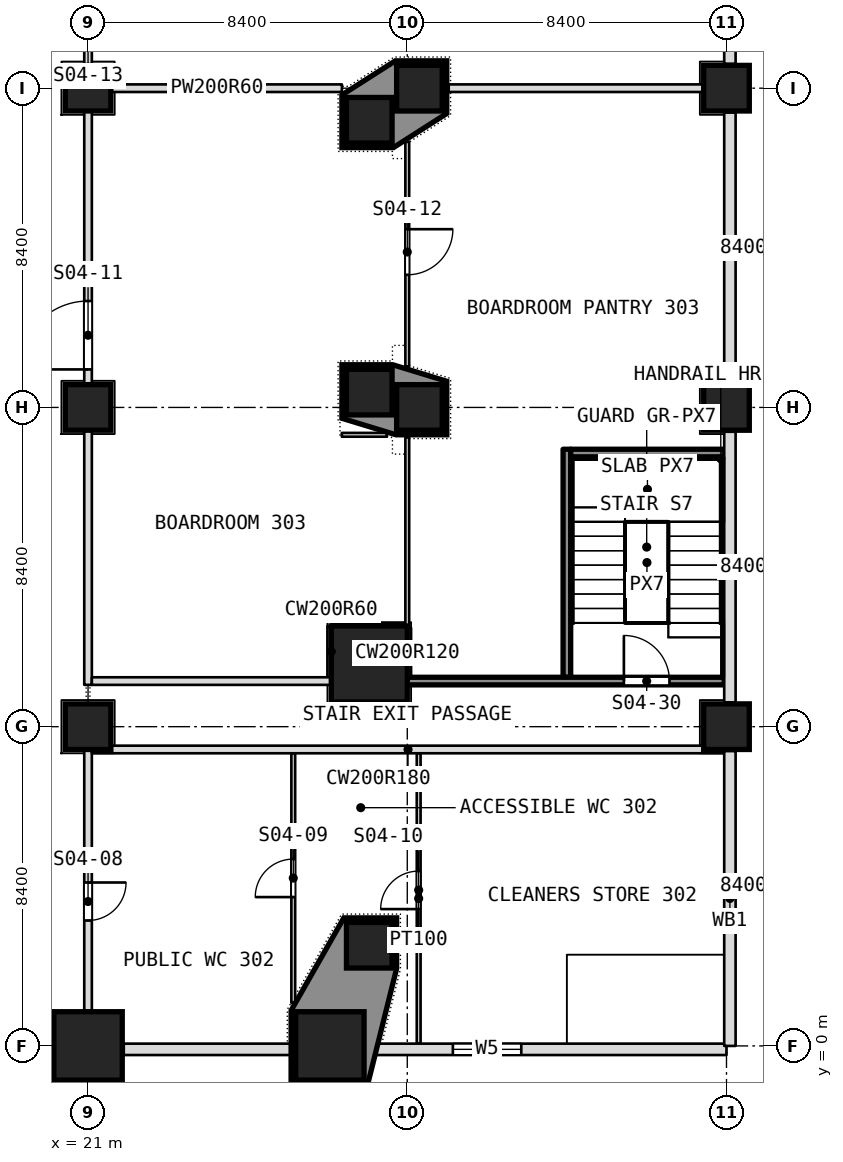
"""IFC4 building model, lengths in metres.
Left out: names, types, materials, properties, quantities, classifications, styles, units other than length and angle.
Written with IfcOpenShell. Run it as: python <this file> out.ifc"""

import sys

from ifc_helpers import new_model, si_unit, direction, frame, frame_2d, origin, origin_2d, place, context, subcontext, project, spatial, polyline, rectangle, outline, extrude, element, fill, save


model = new_model("IFC4")
c1 = context("Model", 3, precision=1e-05, world=origin(), true_north=direction((0.0, 1.0)))
c2 = subcontext(c1, "Body", "Model", "MODEL_VIEW")
j1 = project(units=[si_unit("LENGTHUNIT", "METRE"), si_unit("PLANEANGLEUNIT", "RADIAN")], contexts=[c1])
p1 = place(None, origin())
s1 = spatial("IfcSite", under=j1, at=p1, CompositionType="ELEMENT")
p2 = place(p1, origin())
s2 = spatial("IfcBuilding", under=s1, at=p2, CompositionType="ELEMENT")
p3 = place(p2, frame((0.0, 0.0, 21.0)))
s3 = spatial("IfcBuildingStorey", under=s2, at=p3, CompositionType="ELEMENT", Elevation=21.0)
p4 = place(p3, frame((21.0, 0.0, 0.0), z_axis=(0.0, 0.0, 1.0), x_axis=(1.0, 0.0, 0.0)))
e1 = element("IfcColumn", 1, at=p4, inside=s3, PredefinedType="COLUMN", context=c2, shape_type="SweptSolid", body=[
    extrude(rectangle(XDim=1.8, YDim=1.8, at=origin_2d()), origin(), (0.0, 0.0, 1.0), 5.0),
])
for number, where, z_axis, x_axis in (
    (2, (21.0, 8.4, 0.0), (0.0, 0.0, 1.0), (1.0, 0.0, 0.0)),
    (3, (37.8, 8.4, 0.0), (0.0, 0.0, 1.0), (1.0, 0.0, 0.0)),
    (4, (21.0, 16.8, 0.0), (0.0, 0.0, 1.0), (1.0, 0.0, 0.0)),
    (5, (29.72, 16.8, 0.0), (0.0, 0.0, 1.0), (1.0, 0.0, 0.0)),
    (6, (37.8, 16.8, 0.0), (0.0, 0.0, 1.0), (1.0, 0.0, 0.0)),
    (7, (21.0, 25.2, 0.0), (0.0, 0.0, 1.0), (1.0, 0.0, 0.0)),
    (8, (29.72, 25.2, 0.0), (0.0, 0.0, 1.0), (1.0, 0.0, 0.0)),
    (9, (37.8, 25.2, 0.0), (0.0, 0.0, 1.0), (1.0, 0.0, 0.0)),
):
    element("IfcColumn", number, at=place(p3, frame(where, z_axis=z_axis, x_axis=x_axis)), inside=s3, PredefinedType="COLUMN", context=c2, shape_type="SweptSolid", body=[
        extrude(rectangle(XDim=1.2, YDim=1.2, at=origin_2d()), origin(), (0.0, 0.0, 1.0), 5.0),
    ])
p5 = place(p3, frame((27.363, 0.0, 0.0), z_axis=(0.0, 0.0, 1.0), x_axis=(1.0, 0.0, 0.0)))
e10 = element("IfcColumn", 10, at=p5, inside=s3, PredefinedType="COLUMN", context=c2, shape_type="SweptSolid", body=[
    extrude(rectangle(XDim=1.8, YDim=1.8, at=origin_2d()), origin(), (0.0, 0.0, 1.0), 5.0),
])
p6 = place(p3, frame((28.4, 10.05, 0.0), z_axis=(0.0, 0.0, 1.0), x_axis=(1.0, 0.0, 0.0)))
e11 = element("IfcColumn", 11, at=p6, inside=s3, PredefinedType="COLUMN", context=c2, shape_type="SweptSolid", body=[
    extrude(rectangle(XDim=2.0, YDim=2.0, at=origin_2d()), origin(), (0.0, 0.0, 1.0), 5.0),
])
p7 = place(p3, frame((37.8, 2.4, 0.0), z_axis=(1.0, 0.0, 0.0), x_axis=(0.0, 0.0, 1.0)))
e12 = element("IfcWall", 12, at=p7, inside=s3, PredefinedType="SOLIDWALL", context=c2, shape_type="SweptSolid", body=[
    extrude(outline(polyline([(0.0, 0.0), (5.0, 0.0), (5.0, 5.279), (4.641, 4.8), (3.435, 3.6), (1.8, 2.4), (0.0, 1.495), (0.0, 0.0)])), origin(), (0.0, 0.0, -1.0), 4.2),
])
for number, where, z_axis, x_axis in (
    (13, (28.4, 24.356, 0.0), (0.0, 0.0, 1.0), (1.0, 0.0, 0.0)),
    (14, (28.4, 17.203, 0.0), (0.0, 0.0, 1.0), (1.0, 0.0, 0.0)),
    (15, (28.4, 2.649, 0.0), (0.0, 0.0, 1.0), (1.0, 0.0, 0.0)),
):
    element("IfcColumn", number, at=place(p3, frame(where, z_axis=z_axis, x_axis=x_axis)), inside=s3, PredefinedType="COLUMN", context=c2, shape_type="SweptSolid", body=[
        extrude(rectangle(XDim=1.2, YDim=1.2, at=origin_2d()), origin(), (0.0, 0.0, 1.0), 5.0),
    ])
p8 = place(p3, frame((33.6, 9.7, 0.0), z_axis=(0.0, 0.0, 1.0), x_axis=(0.0, 1.0, 0.0)))
e16 = element("IfcWall", 16, at=p8, inside=s3, PredefinedType="PARTITIONING", context=c2, shape_type="SweptSolid", body=[
    extrude(rectangle(XDim=6.0, YDim=0.2, at=frame_2d((3.0, 0.0))), origin(), (0.0, 0.0, 1.0), 4.68),
])
p9 = place(p3, frame((29.7, 0.06, 0.0), z_axis=(0.0, 0.0, 1.0), x_axis=(0.0, 1.0, 0.0)))
e17 = element("IfcWall", 17, at=p9, inside=s3, PredefinedType="PARTITIONING", context=c2, shape_type="SweptSolid", body=[
    extrude(rectangle(XDim=7.64, YDim=0.1, at=frame_2d((3.82, 0.0))), origin(), (0.0, 0.0, 1.0), 4.68),
])
p10 = place(p9, frame((3.54, 0.0, 0.0)))
e18 = element("IfcOpeningElement", 18, at=p10, cuts=e17, PredefinedType="OPENING", context=c2, shape_type="SweptSolid", body=[
    extrude(rectangle(XDim=1.0, YDim=2.1, at=frame_2d((0.5, 1.05))), frame((0.0, 0.05, 0.0), z_axis=(0.0, -1.0, 0.0), x_axis=(1.0, 0.0, 0.0)), (0.0, 0.0, 1.0), 0.1),
])
p11 = place(p3, frame((29.4, 9.7, 0.0), z_axis=(0.0, 0.0, 1.0), x_axis=(0.0, 1.0, 0.0)))
e19 = element("IfcWall", 19, at=p11, inside=s3, PredefinedType="PARTITIONING", context=c2, shape_type="SweptSolid", body=[
    extrude(rectangle(XDim=1.3, YDim=0.2, at=frame_2d((0.65, 0.0))), origin(), (0.0, 0.0, 1.0), 4.68),
])
p12 = place(p3, frame((29.4, 11.0, 0.0), z_axis=(0.0, 0.0, 1.0), x_axis=(0.0, 1.0, 0.0)))
e20 = element("IfcWall", 20, at=p12, inside=s3, PredefinedType="PARTITIONING", context=c2, shape_type="SweptSolid", body=[
    extrude(rectangle(XDim=5.012, YDim=0.1, at=frame_2d((2.506, 0.0))), origin(), (0.0, 0.0, 1.0), 4.68),
])
p13 = place(p3, frame((29.4, 17.878, 0.0), z_axis=(0.0, 0.0, 1.0), x_axis=(0.0, 1.0, 0.0)))
e21 = element("IfcWall", 21, at=p13, inside=s3, PredefinedType="PARTITIONING", context=c2, shape_type="SweptSolid", body=[
    extrude(rectangle(XDim=5.911, YDim=0.1, at=frame_2d((2.956, 0.0))), origin(), (0.0, 0.0, 1.0), 4.68),
])
p14 = place(p13, frame((2.412, 0.0, 0.0)))
e22 = element("IfcOpeningElement", 22, at=p14, cuts=e21, PredefinedType="OPENING", context=c2, shape_type="SweptSolid", body=[
    extrude(rectangle(XDim=1.2, YDim=2.1, at=frame_2d((0.6, 1.05))), frame((0.0, 0.05, 0.0), z_axis=(0.0, -1.0, 0.0), x_axis=(1.0, 0.0, 0.0)), (0.0, 0.0, 1.0), 0.1),
])
p15 = place(p3, frame((27.4, 9.7, 0.0), z_axis=(0.0, 0.0, 1.0), x_axis=(0.0, 1.0, 0.0)))
e23 = element("IfcWall", 23, at=p15, inside=s3, PredefinedType="PARTITIONING", context=c2, shape_type="SweptSolid", body=[
    extrude(rectangle(XDim=1.352, YDim=0.2, at=frame_2d((0.676, 0.0))), origin(), (0.0, 0.0, 1.0), 4.68),
])
p16 = place(p3, frame((26.4, 1.133, 0.0), z_axis=(0.0, 0.0, 1.0), x_axis=(0.0, 1.0, 0.0)))
e24 = element("IfcWall", 24, at=p16, inside=s3, PredefinedType="PARTITIONING", context=c2, shape_type="SweptSolid", body=[
    extrude(rectangle(XDim=6.567, YDim=0.1, at=frame_2d((3.283, 0.0))), origin(), (0.0, 0.0, 1.0), 4.68),
])
p17 = place(p16, frame((2.783, 0.0, 0.0)))
e25 = element("IfcOpeningElement", 25, at=p17, cuts=e24, PredefinedType="OPENING", context=c2, shape_type="SweptSolid", body=[
    extrude(rectangle(XDim=1.0, YDim=2.1, at=frame_2d((0.5, 1.05))), frame((0.0, 0.05, 0.0), z_axis=(0.0, -1.0, 0.0), x_axis=(1.0, 0.0, 0.0)), (0.0, 0.0, 1.0), 0.1),
])
p18 = place(p3, frame((21.0, -0.3, 0.0), z_axis=(0.0, 0.0, 1.0), x_axis=(0.0, 1.0, 0.0)))
e26 = element("IfcWall", 26, at=p18, inside=s3, PredefinedType="PARTITIONING", context=c2, shape_type="SweptSolid", body=[
    extrude(rectangle(XDim=8.2, YDim=0.2, at=frame_2d((4.1, 0.0))), origin(), (0.0, 0.0, 1.0), 4.68),
])
p19 = place(p18, frame((3.6, 0.0, 0.0)))
e27 = element("IfcOpeningElement", 27, at=p19, cuts=e26, PredefinedType="OPENING", context=c2, shape_type="SweptSolid", body=[
    extrude(rectangle(XDim=1.0, YDim=2.1, at=frame_2d((0.5, 1.05))), frame((0.0, 0.1, 0.0), z_axis=(0.0, -1.0, 0.0), x_axis=(1.0, 0.0, 0.0)), (0.0, 0.0, 1.0), 0.2),
])
p20 = place(p3, frame((21.0, 9.5, 0.0), z_axis=(0.0, 0.0, 1.0), x_axis=(0.0, 1.0, 0.0)))
e28 = element("IfcWall", 28, at=p20, inside=s3, PredefinedType="PARTITIONING", context=c2, shape_type="SweptSolid", body=[
    extrude(rectangle(XDim=22.871, YDim=0.2, at=frame_2d((11.436, 0.0))), origin(), (0.0, 0.0, 1.0), 4.68),
])
p21 = place(p20, frame((8.3, 0.0, 0.0)))
e29 = element("IfcOpeningElement", 29, at=p21, cuts=e28, PredefinedType="OPENING", context=c2, shape_type="SweptSolid", body=[
    extrude(rectangle(XDim=1.8, YDim=2.1, at=frame_2d((0.9, 1.05))), frame((0.0, 0.1, 0.0), z_axis=(0.0, -1.0, 0.0), x_axis=(1.0, 0.0, 0.0)), (0.0, 0.0, 1.0), 0.2),
])
p22 = place(p20, frame((16.717, 0.0, 0.0)))
e30 = element("IfcOpeningElement", 30, at=p22, cuts=e28, PredefinedType="OPENING", context=c2, shape_type="SweptSolid", body=[
    extrude(rectangle(XDim=1.8, YDim=2.1, at=frame_2d((0.9, 1.05))), frame((0.0, 0.1, 0.0), z_axis=(0.0, -1.0, 0.0), x_axis=(1.0, 0.0, 0.0)), (0.0, 0.0, 1.0), 0.2),
])
p23 = place(p3, frame((21.1, 7.8, 0.0), z_axis=(0.0, 0.0, 1.0), x_axis=(1.0, 0.0, 0.0)))
e31 = element("IfcWall", 31, at=p23, inside=s3, PredefinedType="PARTITIONING", context=c2, shape_type="SweptSolid", body=[
    extrude(rectangle(XDim=16.64, YDim=0.2, at=frame_2d((8.32, 0.0))), origin(), (0.0, 0.0, 1.0), 4.68),
])
p24 = place(p3, frame((21.1, 9.6, 0.0), z_axis=(0.0, 0.0, 1.0), x_axis=(1.0, 0.0, 0.0)))
e32 = element("IfcWall", 32, at=p24, inside=s3, PredefinedType="PARTITIONING", context=c2, shape_type="SweptSolid", body=[
    extrude(rectangle(XDim=6.4, YDim=0.2, at=frame_2d((3.2, 0.0))), origin(), (0.0, 0.0, 1.0), 4.68),
])
p25 = place(p3, frame((29.3, 9.6, 0.0), z_axis=(0.0, 0.0, 1.0), x_axis=(1.0, 0.0, 0.0)))
e33 = element("IfcWall", 33, at=p25, inside=s3, PredefinedType="PARTITIONING", context=c2, shape_type="SweptSolid", body=[
    extrude(rectangle(XDim=8.44, YDim=0.2, at=frame_2d((4.22, 0.0))), origin(), (0.0, 0.0, 1.0), 4.68),
])
p26 = place(p25, frame((5.8, 0.0, 0.0)))
e34 = element("IfcOpeningElement", 34, at=p26, cuts=e33, PredefinedType="OPENING", context=c2, shape_type="SweptSolid", body=[
    extrude(rectangle(XDim=1.2, YDim=2.1, at=frame_2d((0.6, 1.05))), frame((0.0, 0.1, 0.0), z_axis=(0.0, -1.0, 0.0), x_axis=(1.0, 0.0, 0.0)), (0.0, 0.0, 1.0), 0.2),
])
p27 = place(p3, frame((27.398, 11.05, 0.0), z_axis=(0.0, 0.0, 1.0), x_axis=(1.0, 0.0, 0.0)))
e35 = element("IfcWall", 35, at=p27, inside=s3, PredefinedType="PARTITIONING", context=c2, shape_type="SweptSolid", body=[
    extrude(rectangle(XDim=1.952, YDim=0.1, at=frame_2d((0.976, 0.0))), origin(), (0.0, 0.0, 1.0), 4.68),
])
p28 = place(p3, frame((33.7, 15.6, 0.0), z_axis=(0.0, 0.0, 1.0), x_axis=(1.0, 0.0, 0.0)))
e36 = element("IfcWall", 36, at=p28, inside=s3, PredefinedType="PARTITIONING", context=c2, shape_type="SweptSolid", body=[
    extrude(rectangle(XDim=4.04, YDim=0.2, at=frame_2d((2.02, 0.0))), origin(), (0.0, 0.0, 1.0), 4.68),
])
p29 = place(p3, frame((27.678, 16.08, 0.0), z_axis=(0.0, 0.0, 1.0), x_axis=(1.0, 0.0, 0.0)))
e37 = element("IfcWall", 37, at=p29, inside=s3, PredefinedType="PARTITIONING", context=c2, shape_type="SweptSolid", body=[
    extrude(rectangle(XDim=1.186, YDim=0.1, at=frame_2d((0.593, 0.0))), origin(), (0.0, 0.0, 1.0), 4.68),
])
p30 = place(p3, frame((21.1, 25.2, 0.0), z_axis=(0.0, 0.0, 1.0), x_axis=(1.0, 0.0, 0.0)))
e38 = element("IfcWall", 38, at=p30, inside=s3, PredefinedType="PARTITIONING", context=c2, shape_type="SweptSolid", body=[
    extrude(rectangle(XDim=6.58, YDim=0.2, at=frame_2d((3.29, 0.0))), origin(), (0.0, 0.0, 1.0), 4.68),
])
p31 = place(p3, frame((30.49, 25.2, 0.0), z_axis=(0.0, 0.0, 1.0), x_axis=(1.0, 0.0, 0.0)))
e39 = element("IfcWall", 39, at=p31, inside=s3, PredefinedType="PARTITIONING", context=c2, shape_type="SweptSolid", body=[
    extrude(rectangle(XDim=7.61, YDim=0.2, at=frame_2d((3.805, 0.0))), origin(), (0.0, 0.0, 1.0), 4.68),
])
p32 = place(p3, frame((16.8, -0.09, 0.0), z_axis=(0.0, 0.0, 1.0), x_axis=(1.0, 0.0, 0.0)))
e40 = element("IfcWall", 40, at=p32, inside=s3, PredefinedType="NOTDEFINED", context=c2, shape_type="SweptSolid", body=[
    extrude(rectangle(XDim=3.26, YDim=0.3, at=frame_2d((1.63, 0.0))), origin(), (0.0, 0.0, 1.0), 5.0),
])
p33 = place(p3, frame((21.94, -0.09, 0.0), z_axis=(0.0, 0.0, 1.0), x_axis=(1.0, 0.0, 0.0)))
e41 = element("IfcWall", 41, at=p33, inside=s3, PredefinedType="NOTDEFINED", context=c2, shape_type="SweptSolid", body=[
    extrude(rectangle(XDim=4.483, YDim=0.3, at=frame_2d((2.242, 0.0))), origin(), (0.0, 0.0, 1.0), 3.78),
])
p34 = place(p3, frame((28.303, -0.09, 0.0), z_axis=(0.0, 0.0, 1.0), x_axis=(1.0, 0.0, 0.0)))
e42 = element("IfcWall", 42, at=p34, inside=s3, PredefinedType="NOTDEFINED", context=c2, shape_type="SweptSolid", body=[
    extrude(rectangle(XDim=9.497, YDim=0.3, at=frame_2d((4.749, 0.0))), origin(), (0.0, 0.0, 1.0), 3.78),
])
p35 = place(p34, frame((2.297, 0.0, 1.2)))
e43 = element("IfcOpeningElement", 43, at=p35, cuts=e42, PredefinedType="OPENING", context=c2, shape_type="SweptSolid", body=[
    extrude(rectangle(XDim=1.8, YDim=2.4, at=frame_2d((0.9, 1.2))), frame((0.0, 0.15, 0.0), z_axis=(0.0, -1.0, 0.0), x_axis=(1.0, 0.0, 0.0)), (0.0, 0.0, 1.0), 0.3),
])
p36 = place(p3, frame((37.89, 0.0, 0.0), z_axis=(0.0, 0.0, 1.0), x_axis=(0.0, 1.0, 0.0)))
e44 = element("IfcWall", 44, at=p36, inside=s3, PredefinedType="NOTDEFINED", context=c2, shape_type="SweptSolid", body=[
    extrude(rectangle(XDim=7.76, YDim=0.3, at=frame_2d((3.88, 0.0))), origin(), (0.0, 0.0, 1.0), 3.78),
])
p37 = place(p3, frame((37.89, 9.04, 0.0), z_axis=(0.0, 0.0, 1.0), x_axis=(0.0, 1.0, 0.0)))
e45 = element("IfcWall", 45, at=p37, inside=s3, PredefinedType="NOTDEFINED", context=c2, shape_type="SweptSolid", body=[
    extrude(rectangle(XDim=7.12, YDim=0.3, at=frame_2d((3.56, 0.0))), origin(), (0.0, 0.0, 1.0), 5.0),
])
p38 = place(p3, frame((37.89, 17.44, 0.0), z_axis=(0.0, 0.0, 1.0), x_axis=(0.0, 1.0, 0.0)))
e46 = element("IfcWall", 46, at=p38, inside=s3, PredefinedType="NOTDEFINED", context=c2, shape_type="SweptSolid", body=[
    extrude(rectangle(XDim=7.12, YDim=0.3, at=frame_2d((3.56, 0.0))), origin(), (0.0, 0.0, 1.0), 3.78),
])
p39 = place(p3, frame((37.89, 25.84, 0.0), z_axis=(0.0, 0.0, 1.0), x_axis=(0.0, 1.0, 0.0)))
e47 = element("IfcWall", 47, at=p39, inside=s3, PredefinedType="NOTDEFINED", context=c2, shape_type="SweptSolid", body=[
    extrude(rectangle(XDim=7.12, YDim=0.3, at=frame_2d((3.56, 0.0))), origin(), (0.0, 0.0, 1.0), 3.78),
])
p40 = place(p3, origin())
e48 = element("IfcWall", 48, at=p40, inside=s3, PredefinedType="SOLIDWALL", context=c2, shape_type="SweptSolid", body=[
    extrude(outline(polyline([(27.68, 25.022), (29.085, 25.92), (30.44, 25.92), (30.44, 24.534), (29.035, 23.636), (27.68, 23.636), (27.68, 25.022)]), holes=[polyline([(29.12, 24.6), (30.32, 24.6), (30.32, 25.8), (29.12, 25.8), (29.12, 24.6)]), polyline([(27.8, 23.756), (29.0, 23.756), (29.0, 24.956), (27.8, 24.956), (27.8, 23.756)])]), origin(), (0.0, 0.0, 1.0), 5.0),
])
p41 = place(p3, origin())
e49 = element("IfcWall", 49, at=p41, inside=s3, PredefinedType="SOLIDWALL", context=c2, shape_type="SweptSolid", body=[
    extrude(outline(polyline([(27.68, 16.514), (27.68, 17.923), (29.018, 17.923), (30.44, 17.489), (30.44, 16.08), (29.102, 16.08), (27.68, 16.514)]), holes=[polyline([(29.12, 16.2), (30.32, 16.2), (30.32, 17.4), (29.12, 17.4), (29.12, 16.2)]), polyline([(27.8, 16.603), (29.0, 16.603), (29.0, 17.803), (27.8, 17.803), (27.8, 16.603)])]), origin(), (0.0, 0.0, 1.0), 5.0),
])
p42 = place(p3, origin())
e50 = element("IfcWall", 50, at=p42, inside=s3, PredefinedType="SOLIDWALL", context=c2, shape_type="SweptSolid", body=[
    extrude(outline(polyline([(27.73, 3.369), (29.12, 3.369), (29.12, 2.034), (28.357, -1.02), (26.343, -1.02), (26.343, 0.932), (27.73, 3.369)]), holes=[polyline([(29.0, 2.049), (29.0, 3.249), (27.8, 3.249), (27.8, 2.049), (29.0, 2.049)]), polyline([(28.263, -0.9), (28.263, 0.9), (26.463, 0.9), (26.463, -0.9), (28.263, -0.9)])]), origin(), (0.0, 0.0, 1.0), 5.0),
])
p43 = place(p19, origin())
e51 = element("IfcDoor", 51, at=p43, inside=s3, OperationType="SINGLE_SWING_RIGHT", PredefinedType="DOOR", context=c2, shape_type="SweptSolid", body=[
    extrude(rectangle(XDim=1.0, YDim=2.1, at=frame_2d((0.5, 1.05))), frame((0.0, 0.025, 0.0), z_axis=(0.0, -1.0, 0.0), x_axis=(1.0, 0.0, 0.0)), (0.0, 0.0, 1.0), 0.05),
])
fill(e27, e51)
p44 = place(p17, origin())
e52 = element("IfcDoor", 52, at=p44, inside=s3, OperationType="SINGLE_SWING_RIGHT", PredefinedType="DOOR", context=c2, shape_type="SweptSolid", body=[
    extrude(rectangle(XDim=1.0, YDim=2.1, at=frame_2d((0.5, 1.05))), frame((0.0, 0.025, 0.0), z_axis=(0.0, -1.0, 0.0), x_axis=(1.0, 0.0, 0.0)), (0.0, 0.0, 1.0), 0.05),
])
fill(e25, e52)
p45 = place(p10, origin())
e53 = element("IfcDoor", 53, at=p45, inside=s3, OperationType="SINGLE_SWING_RIGHT", PredefinedType="DOOR", context=c2, shape_type="SweptSolid", body=[
    extrude(rectangle(XDim=1.0, YDim=2.1, at=frame_2d((0.5, 1.05))), frame((0.0, 0.025, 0.0), z_axis=(0.0, -1.0, 0.0), x_axis=(1.0, 0.0, 0.0)), (0.0, 0.0, 1.0), 0.05),
])
fill(e18, e53)
p46 = place(p21, origin())
e54 = element("IfcDoor", 54, at=p46, inside=s3, OperationType="DOUBLE_DOOR_SINGLE_SWING", PredefinedType="DOOR", context=c2, shape_type="SweptSolid", body=[
    extrude(rectangle(XDim=1.8, YDim=2.1, at=frame_2d((0.9, 1.05))), frame((0.0, 0.025, 0.0), z_axis=(0.0, -1.0, 0.0), x_axis=(1.0, 0.0, 0.0)), (0.0, 0.0, 1.0), 0.05),
])
fill(e29, e54)
p47 = place(p14, origin())
e55 = element("IfcDoor", 55, at=p47, inside=s3, OperationType="SINGLE_SWING_LEFT", PredefinedType="DOOR", context=c2, shape_type="SweptSolid", body=[
    extrude(rectangle(XDim=1.2, YDim=2.1, at=frame_2d((0.6, 1.05))), frame((0.0, 0.025, 0.0), z_axis=(0.0, -1.0, 0.0), x_axis=(1.0, 0.0, 0.0)), (0.0, 0.0, 1.0), 0.05),
])
fill(e22, e55)
p48 = place(p26, origin())
e56 = element("IfcDoor", 56, at=p48, inside=s3, OperationType="SINGLE_SWING_LEFT", PredefinedType="DOOR", context=c2, shape_type="SweptSolid", body=[
    extrude(rectangle(XDim=1.2, YDim=2.1, at=frame_2d((0.6, 1.05))), frame((0.0, 0.025, 0.0), z_axis=(0.0, -1.0, 0.0), x_axis=(1.0, 0.0, 0.0)), (0.0, 0.0, 1.0), 0.05),
])
fill(e34, e56)
p49 = place(p35, origin())
e57 = element("IfcWindow", 57, at=p49, inside=s3, PartitioningType="SINGLE_PANEL", PredefinedType="WINDOW", context=c2, shape_type="SweptSolid", body=[
    extrude(rectangle(XDim=1.8, YDim=2.4, at=frame_2d((0.9, 1.2))), frame((0.0, 0.03, 0.0), z_axis=(0.0, -1.0, 0.0), x_axis=(1.0, 0.0, 0.0)), (0.0, 0.0, 1.0), 0.06),
])
fill(e43, e57)
save(model, sys.argv[1])
